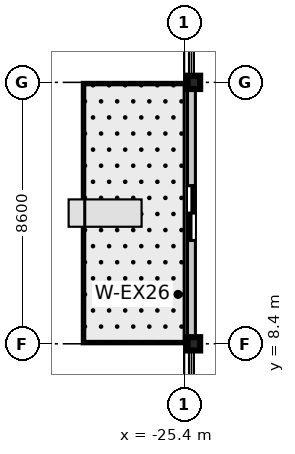
"""IFC4 building model, lengths in metres.
Left out: names, types, materials, properties, quantities, classifications, styles, units other than length and angle.
Written with IfcOpenShell. Run it as: python <this file> out.ifc"""

import sys

from ifc_helpers import new_model, si_unit, direction, frame, frame_2d, origin, origin_2d, place, context, subcontext, project, spatial, rectangle, i_section, extrude, source, transform, mapped, element, fill, save


model = new_model("IFC4")
c1 = context("Model", 3, precision=1e-05, world=origin(), true_north=direction((0.0, 1.0)))
c2 = subcontext(c1, "Body", "Model", "MODEL_VIEW")
j1 = project(units=[si_unit("LENGTHUNIT", "METRE"), si_unit("PLANEANGLEUNIT", "RADIAN")], contexts=[c1])
p1 = place(None, origin())
s1 = spatial("IfcSite", under=j1, at=p1, CompositionType="ELEMENT")
p2 = place(p1, origin())
s2 = spatial("IfcBuilding", under=s1, at=p2, CompositionType="ELEMENT")
p3 = place(p2, frame((0.0, 0.0, 61.6)))
s3 = spatial("IfcBuildingStorey", under=s2, at=p3, CompositionType="ELEMENT", Elevation=61.6)
m1 = source(origin(), c2, "Body", "SweptSolid", [
    extrude(i_section(OverallWidth=0.412, OverallDepth=0.438, WebThickness=0.023, FlangeThickness=0.036, at=origin_2d()), origin(), (0.0, 0.0, 1.0), 3.605),
])
for number, where, z_axis, x_axis in (
    (1, (-25.08, 8.4, 0.0), (0.0, 0.0, 1.0), (1.0, 0.0, 0.0)),
    (2, (-25.08, 17.0, 0.0), (0.0, 0.0, 1.0), (1.0, 0.0, 0.0)),
):
    element("IfcColumn", number, at=place(p3, frame(where, z_axis=z_axis, x_axis=x_axis)), inside=s3, PredefinedType="COLUMN", context=c2, shape_type="MappedRepresentation", body=[
        mapped(m1, transform((0.0, 0.0, 0.0), scale=1.0)),
    ])
m2 = source(origin(), c2, "Body", "SweptSolid", [
    extrude(rectangle(XDim=8.6, YDim=0.26, at=frame_2d((4.3, 0.0))), origin(), (0.0, 0.0, 1.0), 2.85),
])
p4 = place(p3, frame((-25.16, 8.4, 0.0), z_axis=(0.0, 0.0, 1.0), x_axis=(0.0, 1.0, 0.0)))
e3 = element("IfcWall", 3, at=p4, inside=s3, PredefinedType="STANDARD", context=c2, shape_type="MappedRepresentation", body=[
    mapped(m2, transform((0.0, 0.0, 0.0), scale=1.0)),
])
p5 = place(p4, frame((3.4, 0.0, 0.0)))
e4 = element("IfcOpeningElement", 4, at=p5, cuts=e3, PredefinedType="OPENING", context=c2, shape_type="SweptSolid", body=[
    extrude(rectangle(XDim=1.8, YDim=2.25, at=frame_2d((0.9, 1.125))), frame((0.0, 0.14, 0.0), z_axis=(0.0, -1.0, 0.0), x_axis=(1.0, 0.0, 0.0)), (0.0, 0.0, 1.0), 0.28),
])
m3 = source(origin(), c2, "Body", "SweptSolid", [
    extrude(rectangle(XDim=1.8, YDim=2.25, at=frame_2d((0.9, 1.125))), frame((0.0, 0.025, 0.0), z_axis=(0.0, -1.0, 0.0), x_axis=(1.0, 0.0, 0.0)), (0.0, 0.0, 1.0), 0.05),
])
p6 = place(p5, origin())
e5 = element("IfcDoor", 5, at=p6, inside=s3, OperationType="DOUBLE_DOOR_SLIDING", PredefinedType="DOOR", context=c2, shape_type="MappedRepresentation", body=[
    mapped(m3, transform((0.0, 0.0, 0.0), scale=1.0)),
])
fill(e4, e5)
save(model, sys.argv[1])
